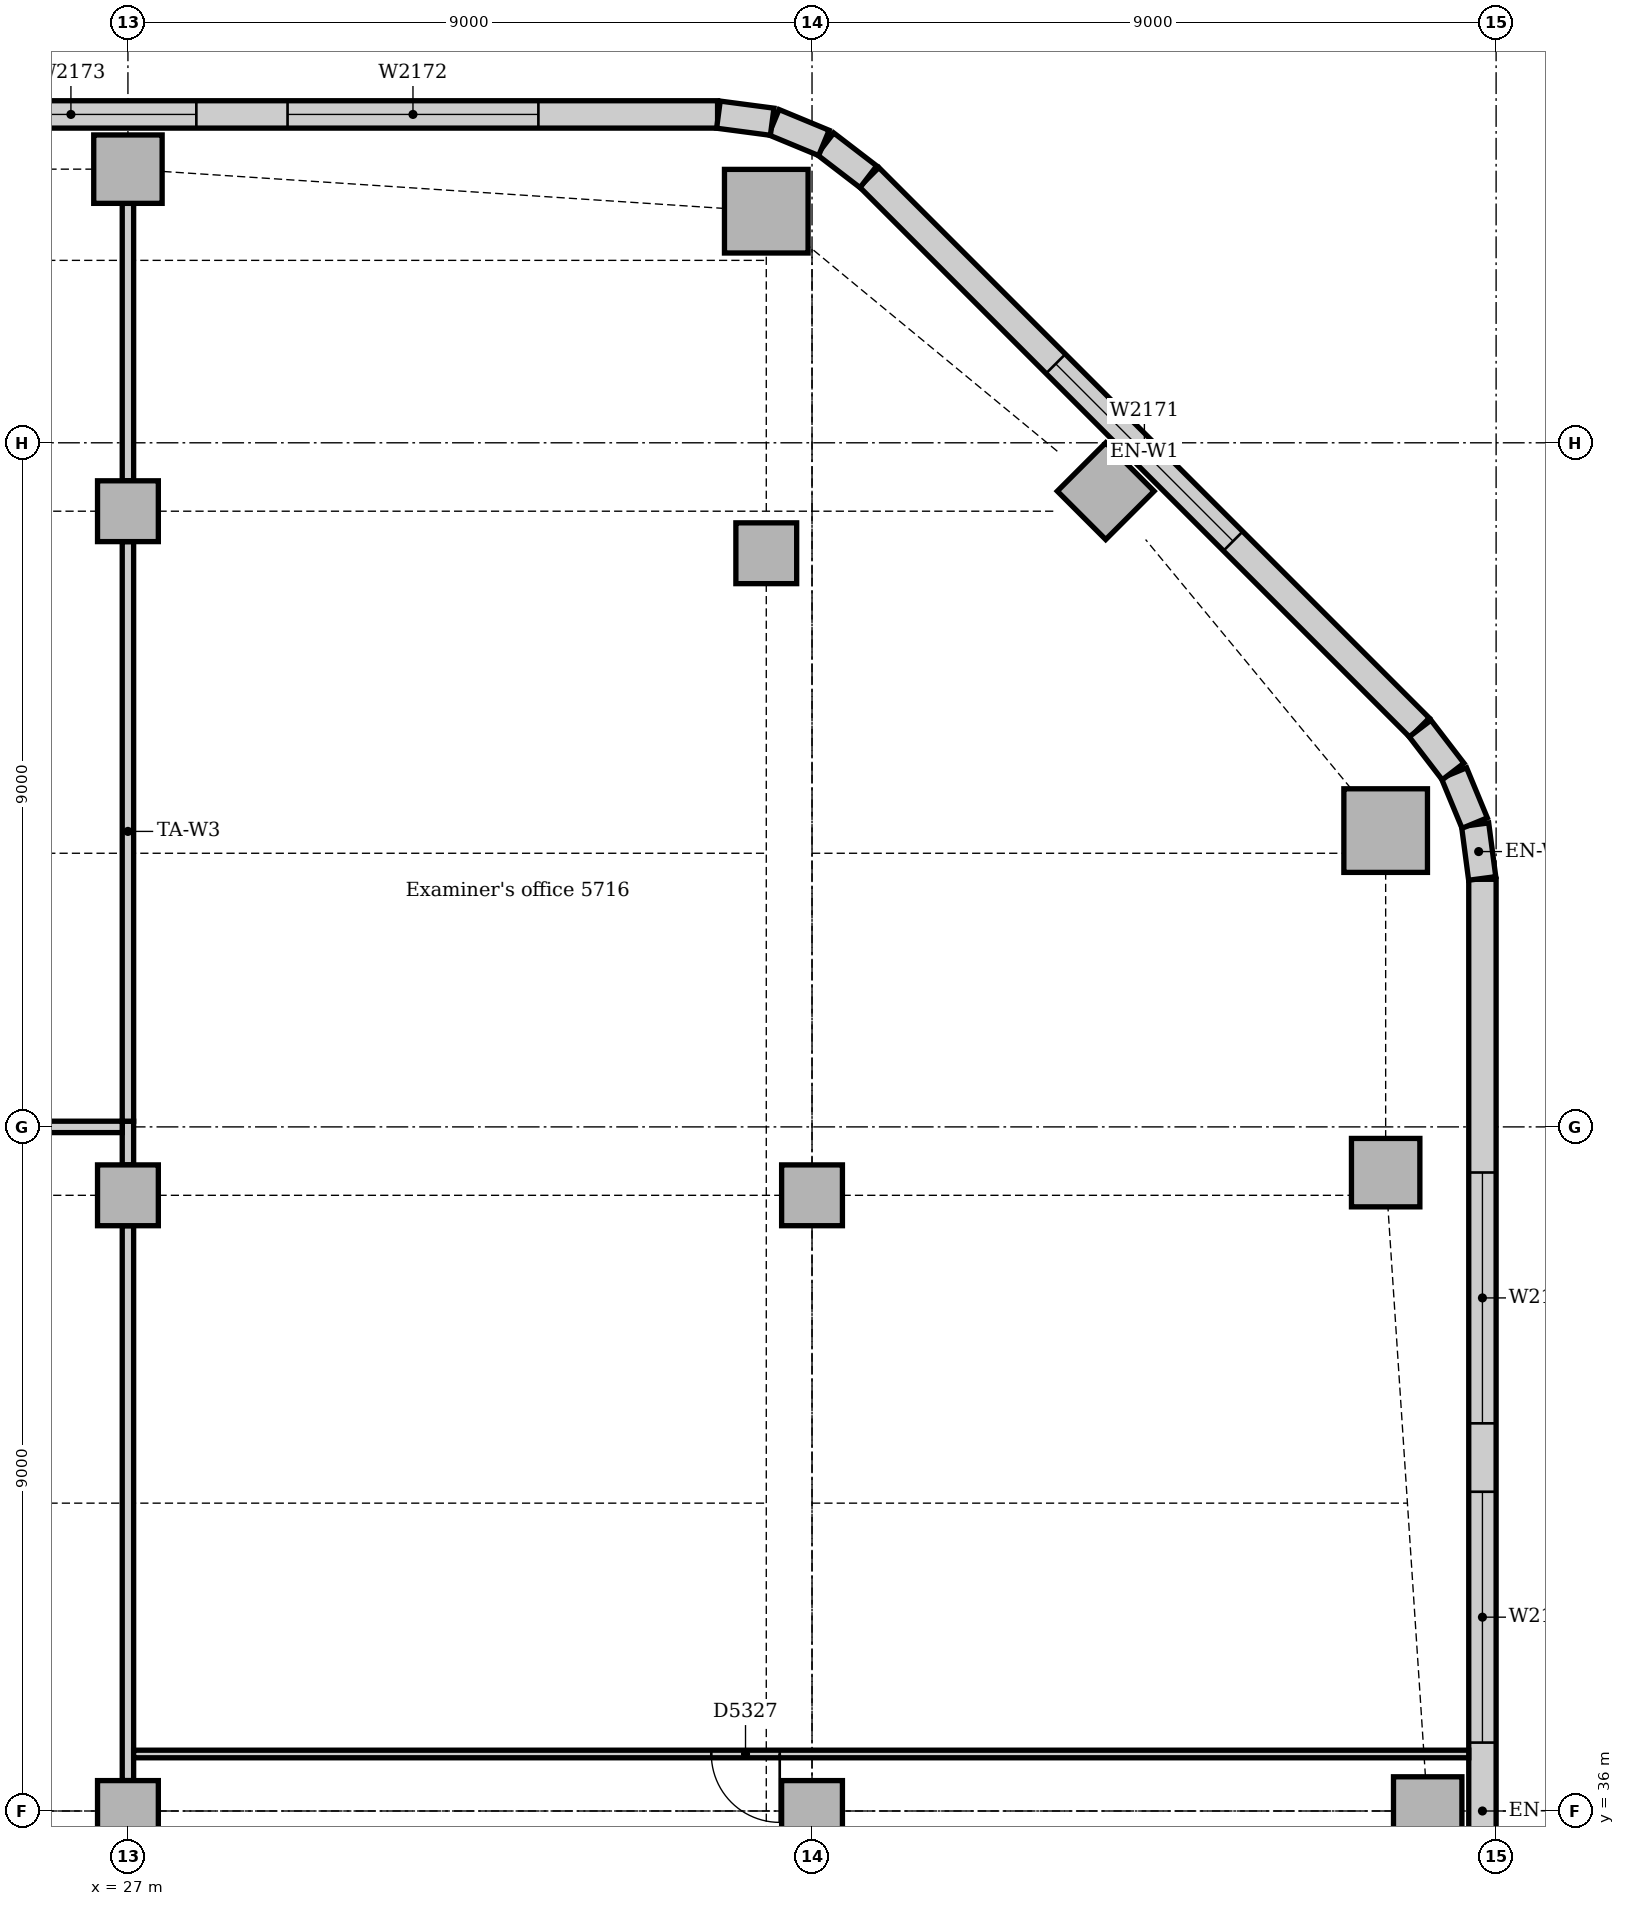
"""IFC4 building model, lengths in metres.
Left out: names, types, materials, properties, quantities, classifications, styles, units other than length and angle.
Written with IfcOpenShell. Run it as: python <this file> out.ifc"""

import sys

from ifc_helpers import new_model, si_unit, direction, frame, frame_2d, origin, origin_2d, place, context, subcontext, project, spatial, rectangle, extrude, element, fill, save


model = new_model("IFC4")
c1 = context("Model", 3, precision=1e-05, world=origin(), true_north=direction((0.0, 1.0)))
c2 = subcontext(c1, "Body", "Model", "MODEL_VIEW")
j1 = project(units=[si_unit("LENGTHUNIT", "METRE"), si_unit("PLANEANGLEUNIT", "RADIAN")], contexts=[c1])
p1 = place(None, origin())
s1 = spatial("IfcSite", under=j1, at=p1, CompositionType="ELEMENT")
p2 = place(p1, origin())
s2 = spatial("IfcBuilding", under=s1, at=p2, CompositionType="ELEMENT")
p3 = place(p2, frame((0.0, 0.0, 238.0)))
s3 = spatial("IfcBuildingStorey", under=s2, at=p3, CompositionType="ELEMENT", Elevation=238.0)
for number, where, z_axis, x_axis in (
    (1, (43.547, 48.898, 0.0), (0.0, 0.0, 1.0), (1.0, 0.0, 0.0)),
    (2, (35.398, 57.047, 0.0), (0.0, 0.0, 1.0), (1.0, 0.0, 0.0)),
):
    element("IfcColumn", number, at=place(p3, frame(where, z_axis=z_axis, x_axis=x_axis)), inside=s3, PredefinedType="COLUMN", context=c2, shape_type="SweptSolid", body=[
        extrude(rectangle(XDim=1.1, YDim=1.1, at=origin_2d()), origin(), (0.0, 0.0, 1.0), 3.7),
    ])
for number, where, z_axis, x_axis in (
    (3, (44.1, 36.0, 0.0), (0.0, 0.0, 1.0), (1.0, 0.0, 0.0)),
    (4, (43.547, 44.398, 0.0), (0.0, 0.0, 1.0), (1.0, 0.0, 0.0)),
    (5, (39.864, 53.364, 0.0), (0.0, 0.0, 1.0), (0.707, 0.707, 0.0)),
    (6, (27.0, 57.6, 0.0), (0.0, 0.0, 1.0), (1.0, 0.0, 0.0)),
):
    element("IfcColumn", number, at=place(p3, frame(where, z_axis=z_axis, x_axis=x_axis)), inside=s3, PredefinedType="COLUMN", context=c2, shape_type="SweptSolid", body=[
        extrude(rectangle(XDim=0.9, YDim=0.9, at=origin_2d()), origin(), (0.0, 0.0, 1.0), 3.7),
    ])
for number, where, z_axis, x_axis in (
    (7, (27.0, 36.0, 0.0), (0.0, 0.0, 1.0), (1.0, 0.0, 0.0)),
    (8, (27.0, 44.1, 0.0), (0.0, 0.0, 1.0), (1.0, 0.0, 0.0)),
    (9, (27.0, 53.1, 0.0), (0.0, 0.0, 1.0), (1.0, 0.0, 0.0)),
    (10, (36.0, 36.0, 0.0), (0.0, 0.0, 1.0), (1.0, 0.0, 0.0)),
    (11, (36.0, 44.1, 0.0), (0.0, 0.0, 1.0), (1.0, 0.0, 0.0)),
    (12, (35.398, 52.547, 0.0), (0.0, 0.0, 1.0), (1.0, 0.0, 0.0)),
):
    element("IfcColumn", number, at=place(p3, frame(where, z_axis=z_axis, x_axis=x_axis)), inside=s3, PredefinedType="COLUMN", context=c2, shape_type="SweptSolid", body=[
        extrude(rectangle(XDim=0.8, YDim=0.8, at=origin_2d()), origin(), (0.0, 0.0, 1.0), 3.7),
    ])
p4 = place(p3, frame((44.82, 23.743, 0.0), z_axis=(0.0, 0.0, 1.0), x_axis=(0.0, 1.0, 0.0)))
e13 = element("IfcWall", 13, at=p4, inside=s3, PredefinedType="STANDARD", context=c2, shape_type="SweptSolid", body=[
    extrude(rectangle(XDim=24.515, YDim=0.36, at=frame_2d((12.257, 0.0))), origin(), (0.0, 0.0, 1.0), 3.7),
])
p5 = place(p4, frame((3.857, 0.0, 0.9)))
e14 = element("IfcOpeningElement", 14, at=p5, cuts=e13, PredefinedType="OPENING", context=c2, shape_type="SweptSolid", body=[
    extrude(rectangle(XDim=3.3, YDim=1.6, at=frame_2d((1.65, 0.8))), frame((0.0, 0.19, 0.0), z_axis=(0.0, -1.0, 0.0), x_axis=(1.0, 0.0, 0.0)), (0.0, 0.0, 1.0), 0.38),
])
p6 = place(p4, frame((8.357, 0.0, 0.9)))
e15 = element("IfcOpeningElement", 15, at=p6, cuts=e13, PredefinedType="OPENING", context=c2, shape_type="SweptSolid", body=[
    extrude(rectangle(XDim=3.3, YDim=1.6, at=frame_2d((1.65, 0.8))), frame((0.0, 0.19, 0.0), z_axis=(0.0, -1.0, 0.0), x_axis=(1.0, 0.0, 0.0)), (0.0, 0.0, 1.0), 0.38),
])
p7 = place(p4, frame((13.157, 0.0, 0.9)))
e16 = element("IfcOpeningElement", 16, at=p7, cuts=e13, PredefinedType="OPENING", context=c2, shape_type="SweptSolid", body=[
    extrude(rectangle(XDim=3.3, YDim=1.6, at=frame_2d((1.65, 0.8))), frame((0.0, 0.19, 0.0), z_axis=(0.0, -1.0, 0.0), x_axis=(1.0, 0.0, 0.0)), (0.0, 0.0, 1.0), 0.38),
])
p8 = place(p4, frame((17.357, 0.0, 0.9)))
e17 = element("IfcOpeningElement", 17, at=p8, cuts=e13, PredefinedType="OPENING", context=c2, shape_type="SweptSolid", body=[
    extrude(rectangle(XDim=3.3, YDim=1.6, at=frame_2d((1.65, 0.8))), frame((0.0, 0.19, 0.0), z_axis=(0.0, -1.0, 0.0), x_axis=(1.0, 0.0, 0.0)), (0.0, 0.0, 1.0), 0.38),
])
p9 = place(p3, frame((43.994, 50.251, 0.0), z_axis=(0.0, 0.0, 1.0), x_axis=(-0.707106781187, 0.707106781187, 0.0)))
e18 = element("IfcWall", 18, at=p9, inside=s3, PredefinedType="STANDARD", context=c2, shape_type="SweptSolid", body=[
    extrude(rectangle(XDim=10.243, YDim=0.36, at=frame_2d((5.121, 0.0))), origin(), (0.0, 0.0, 1.0), 3.7),
])
p10 = place(p9, frame((3.471, 0.0, 0.9)))
e19 = element("IfcOpeningElement", 19, at=p10, cuts=e18, PredefinedType="OPENING", context=c2, shape_type="SweptSolid", body=[
    extrude(rectangle(XDim=3.3, YDim=1.6, at=frame_2d((1.65, 0.8))), frame((0.0, 0.19, 0.0), z_axis=(0.0, -1.0, 0.0), x_axis=(1.0, 0.0, 0.0)), (0.0, 0.0, 1.0), 0.38),
])
p11 = place(p3, frame((34.757, 58.32, 0.0), z_axis=(0.0, 0.0, 1.0), x_axis=(-1.0, 0.0, 0.0)))
e20 = element("IfcWall", 20, at=p11, inside=s3, PredefinedType="STANDARD", context=c2, shape_type="SweptSolid", body=[
    extrude(rectangle(XDim=30.515, YDim=0.36, at=frame_2d((15.257, 0.0))), origin(), (0.0, 0.0, 1.0), 3.7),
])
p12 = place(p11, frame((2.357, 0.0, 0.9)))
e21 = element("IfcOpeningElement", 21, at=p12, cuts=e20, PredefinedType="OPENING", context=c2, shape_type="SweptSolid", body=[
    extrude(rectangle(XDim=3.3, YDim=1.6, at=frame_2d((1.65, 0.8))), frame((0.0, 0.19, 0.0), z_axis=(0.0, -1.0, 0.0), x_axis=(1.0, 0.0, 0.0)), (0.0, 0.0, 1.0), 0.38),
])
p13 = place(p11, frame((6.857, 0.0, 0.9)))
e22 = element("IfcOpeningElement", 22, at=p13, cuts=e20, PredefinedType="OPENING", context=c2, shape_type="SweptSolid", body=[
    extrude(rectangle(XDim=3.3, YDim=1.6, at=frame_2d((1.65, 0.8))), frame((0.0, 0.19, 0.0), z_axis=(0.0, -1.0, 0.0), x_axis=(1.0, 0.0, 0.0)), (0.0, 0.0, 1.0), 0.38),
])
p14 = place(p11, frame((11.357, 0.0, 0.9)))
e23 = element("IfcOpeningElement", 23, at=p14, cuts=e20, PredefinedType="OPENING", context=c2, shape_type="SweptSolid", body=[
    extrude(rectangle(XDim=3.3, YDim=1.6, at=frame_2d((1.65, 0.8))), frame((0.0, 0.19, 0.0), z_axis=(0.0, -1.0, 0.0), x_axis=(1.0, 0.0, 0.0)), (0.0, 0.0, 1.0), 0.38),
])
p15 = place(p11, frame((15.857, 0.0, 0.9)))
e24 = element("IfcOpeningElement", 24, at=p15, cuts=e20, PredefinedType="OPENING", context=c2, shape_type="SweptSolid", body=[
    extrude(rectangle(XDim=3.3, YDim=1.6, at=frame_2d((1.65, 0.8))), frame((0.0, 0.19, 0.0), z_axis=(0.0, -1.0, 0.0), x_axis=(1.0, 0.0, 0.0)), (0.0, 0.0, 1.0), 0.38),
])
p16 = place(p11, frame((20.357, 0.0, 0.9)))
e25 = element("IfcOpeningElement", 25, at=p16, cuts=e20, PredefinedType="OPENING", context=c2, shape_type="SweptSolid", body=[
    extrude(rectangle(XDim=3.3, YDim=1.6, at=frame_2d((1.65, 0.8))), frame((0.0, 0.19, 0.0), z_axis=(0.0, -1.0, 0.0), x_axis=(1.0, 0.0, 0.0)), (0.0, 0.0, 1.0), 0.38),
])
p17 = place(p11, frame((24.857, 0.0, 0.9)))
e26 = element("IfcOpeningElement", 26, at=p17, cuts=e20, PredefinedType="OPENING", context=c2, shape_type="SweptSolid", body=[
    extrude(rectangle(XDim=3.3, YDim=1.6, at=frame_2d((1.65, 0.8))), frame((0.0, 0.19, 0.0), z_axis=(0.0, -1.0, 0.0), x_axis=(1.0, 0.0, 0.0)), (0.0, 0.0, 1.0), 0.38),
])
for number, where, z_axis, x_axis in (
    (27, (44.817, 48.269, 0.0), (0.0, 0.0, 1.0), (-0.131, 0.991, 0.0)),
    (28, (44.718, 48.997, 0.0), (0.0, 0.0, 1.0), (-0.383, 0.924, 0.0)),
):
    element("IfcWall", number, at=place(p3, frame(where, z_axis=z_axis, x_axis=x_axis)), inside=s3, PredefinedType="STANDARD", context=c2, shape_type="SweptSolid", body=[
        extrude(rectangle(XDim=0.713, YDim=0.36, at=frame_2d((0.356, 0.0))), origin(), (0.0, 0.0, 1.0), 3.7),
    ])
for number, where, z_axis, x_axis in (
    (29, (44.434, 49.675, 0.0), (0.0, 0.0, 1.0), (-0.609, 0.793, 0.0)),
    (30, (36.741, 57.5, 0.0), (0.0, 0.0, 1.0), (-0.793, 0.609, 0.0)),
):
    element("IfcWall", number, at=place(p3, frame(where, z_axis=z_axis, x_axis=x_axis)), inside=s3, PredefinedType="STANDARD", context=c2, shape_type="SweptSolid", body=[
        extrude(rectangle(XDim=0.713, YDim=0.36, at=frame_2d((0.357, 0.0))), origin(), (0.0, 0.0, 1.0), 3.7),
    ])
for number, where, z_axis, x_axis in (
    (31, (36.156, 57.945, 0.0), (0.0, 0.0, 1.0), (-0.924, 0.383, 0.0)),
    (32, (35.476, 58.224, 0.0), (0.0, 0.0, 1.0), (-0.991, 0.131, 0.0)),
):
    element("IfcWall", number, at=place(p3, frame(where, z_axis=z_axis, x_axis=x_axis)), inside=s3, PredefinedType="STANDARD", context=c2, shape_type="SweptSolid", body=[
        extrude(rectangle(XDim=0.713, YDim=0.36, at=frame_2d((0.356, 0.0))), origin(), (0.0, 0.0, 1.0), 3.7),
    ])
p18 = place(p3, frame((27.0, 36.4, 0.0), z_axis=(0.0, 0.0, 1.0), x_axis=(0.0, 1.0, 0.0)))
e33 = element("IfcWall", 33, at=p18, inside=s3, PredefinedType="PARTITIONING", context=c2, shape_type="SweptSolid", body=[
    extrude(rectangle(XDim=7.3, YDim=0.15, at=frame_2d((3.65, 0.0))), origin(), (0.0, 0.0, 1.0), 3.2),
])
p19 = place(p3, frame((27.0, 44.5, 0.0), z_axis=(0.0, 0.0, 1.0), x_axis=(0.0, 1.0, 0.0)))
e34 = element("IfcWall", 34, at=p19, inside=s3, PredefinedType="PARTITIONING", context=c2, shape_type="SweptSolid", body=[
    extrude(rectangle(XDim=0.575, YDim=0.15, at=frame_2d((0.287, 0.0))), origin(), (0.0, 0.0, 1.0), 3.2),
])
p20 = place(p3, frame((22.425, 45.0, 0.0), z_axis=(0.0, 0.0, 1.0), x_axis=(1.0, 0.0, 0.0)))
e35 = element("IfcWall", 35, at=p20, inside=s3, PredefinedType="PARTITIONING", context=c2, shape_type="SweptSolid", body=[
    extrude(rectangle(XDim=4.5, YDim=0.15, at=frame_2d((2.25, 0.0))), origin(), (0.0, 0.0, 1.0), 3.7),
])
p21 = place(p20, frame((1.75, 0.0, 0.0)))
e36 = element("IfcOpeningElement", 36, at=p21, cuts=e35, PredefinedType="OPENING", context=c2, shape_type="SweptSolid", body=[
    extrude(rectangle(XDim=1.0, YDim=2.1, at=frame_2d((0.5, 1.05))), frame((0.0, 0.085, 0.0), z_axis=(0.0, -1.0, 0.0), x_axis=(1.0, 0.0, 0.0)), (0.0, 0.0, 1.0), 0.17),
])
p22 = place(p3, frame((27.0, 45.075, 0.0), z_axis=(0.0, 0.0, 1.0), x_axis=(0.0, 1.0, 0.0)))
e37 = element("IfcWall", 37, at=p22, inside=s3, PredefinedType="PARTITIONING", context=c2, shape_type="SweptSolid", body=[
    extrude(rectangle(XDim=7.625, YDim=0.15, at=frame_2d((3.812, 0.0))), origin(), (0.0, 0.0, 1.0), 3.2),
])
p23 = place(p3, frame((27.0, 53.5, 0.0), z_axis=(0.0, 0.0, 1.0), x_axis=(0.0, 1.0, 0.0)))
e38 = element("IfcWall", 38, at=p23, inside=s3, PredefinedType="PARTITIONING", context=c2, shape_type="SweptSolid", body=[
    extrude(rectangle(XDim=3.65, YDim=0.15, at=frame_2d((1.825, 0.0))), origin(), (0.0, 0.0, 1.0), 3.26),
])
p24 = place(p3, frame((27.075, 36.75, 0.0), z_axis=(0.0, 0.0, 1.0), x_axis=(1.0, 0.0, 0.0)))
e39 = element("IfcWall", 39, at=p24, inside=s3, PredefinedType="PARTITIONING", context=c2, shape_type="SweptSolid", body=[
    extrude(rectangle(XDim=17.565, YDim=0.1, at=frame_2d((8.783, 0.0))), origin(), (0.0, 0.0, 1.0), 3.7),
])
p25 = place(p24, frame((7.6, 0.0, 0.0)))
e40 = element("IfcOpeningElement", 40, at=p25, cuts=e39, PredefinedType="OPENING", context=c2, shape_type="SweptSolid", body=[
    extrude(rectangle(XDim=0.9, YDim=2.1, at=frame_2d((0.45, 1.05))), frame((0.0, 0.06, 0.0), z_axis=(0.0, -1.0, 0.0), x_axis=(1.0, 0.0, 0.0)), (0.0, 0.0, 1.0), 0.12),
])
p26 = place(p7, origin())
e41 = element("IfcWindow", 41, at=p26, inside=s3, PartitioningType="SINGLE_PANEL", PredefinedType="WINDOW", context=c2, shape_type="SweptSolid", body=[
    extrude(rectangle(XDim=3.3, YDim=1.6, at=frame_2d((1.65, 0.8))), frame((0.0, 0.13, 0.0), z_axis=(0.0, -1.0, 0.0), x_axis=(1.0, 0.0, 0.0)), (0.0, 0.0, 1.0), 0.06),
])
fill(e16, e41)
p27 = place(p8, origin())
e42 = element("IfcWindow", 42, at=p27, inside=s3, PartitioningType="SINGLE_PANEL", PredefinedType="WINDOW", context=c2, shape_type="SweptSolid", body=[
    extrude(rectangle(XDim=3.3, YDim=1.6, at=frame_2d((1.65, 0.8))), frame((0.0, 0.13, 0.0), z_axis=(0.0, -1.0, 0.0), x_axis=(1.0, 0.0, 0.0)), (0.0, 0.0, 1.0), 0.06),
])
fill(e17, e42)
p28 = place(p10, origin())
e43 = element("IfcWindow", 43, at=p28, inside=s3, PartitioningType="SINGLE_PANEL", PredefinedType="WINDOW", context=c2, shape_type="SweptSolid", body=[
    extrude(rectangle(XDim=3.3, YDim=1.6, at=frame_2d((1.65, 0.8))), frame((0.0, 0.13, 0.0), z_axis=(0.0, -1.0, 0.0), x_axis=(1.0, 0.0, 0.0)), (0.0, 0.0, 1.0), 0.06),
])
fill(e19, e43)
p29 = place(p12, origin())
e44 = element("IfcWindow", 44, at=p29, inside=s3, PartitioningType="SINGLE_PANEL", PredefinedType="WINDOW", context=c2, shape_type="SweptSolid", body=[
    extrude(rectangle(XDim=3.3, YDim=1.6, at=frame_2d((1.65, 0.8))), frame((0.0, 0.13, 0.0), z_axis=(0.0, -1.0, 0.0), x_axis=(1.0, 0.0, 0.0)), (0.0, 0.0, 1.0), 0.06),
])
fill(e21, e44)
p30 = place(p13, origin())
e45 = element("IfcWindow", 45, at=p30, inside=s3, PartitioningType="SINGLE_PANEL", PredefinedType="WINDOW", context=c2, shape_type="SweptSolid", body=[
    extrude(rectangle(XDim=3.3, YDim=1.6, at=frame_2d((1.65, 0.8))), frame((0.0, 0.13, 0.0), z_axis=(0.0, -1.0, 0.0), x_axis=(1.0, 0.0, 0.0)), (0.0, 0.0, 1.0), 0.06),
])
fill(e22, e45)
p31 = place(p25, frame((0.9, 0.0, 0.0), z_axis=(0.0, 0.0, 1.0), x_axis=(-1.0, 0.0, 0.0)))
e46 = element("IfcDoor", 46, at=p31, inside=s3, OperationType="SINGLE_SWING_LEFT", PredefinedType="DOOR", context=c2, shape_type="SweptSolid", body=[
    extrude(rectangle(XDim=0.9, YDim=2.1, at=frame_2d((0.45, 1.05))), frame((0.0, 0.025, 0.0), z_axis=(0.0, -1.0, 0.0), x_axis=(1.0, 0.0, 0.0)), (0.0, 0.0, 1.0), 0.05),
])
fill(e40, e46)
save(model, sys.argv[1])
